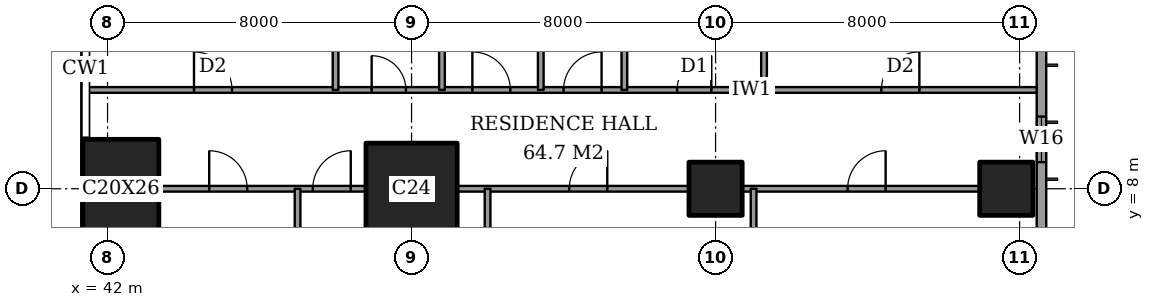
"""IFC4 building model, lengths in metres.
Left out: names, types, materials, properties, quantities, classifications, styles, units other than length and angle.
Written with IfcOpenShell. Run it as: python <this file> out.ifc"""

import sys

from ifc_helpers import new_model, si_unit, direction, frame, frame_2d, origin, origin_2d, place, context, subcontext, project, spatial, rectangle, extrude, element, fill, save


model = new_model("IFC4")
c1 = context("Model", 3, precision=1e-05, world=origin(), true_north=direction((0.0, 1.0)))
c2 = subcontext(c1, "Body", "Model", "MODEL_VIEW")
j1 = project(units=[si_unit("LENGTHUNIT", "METRE"), si_unit("PLANEANGLEUNIT", "RADIAN")], contexts=[c1])
p1 = place(None, origin())
s1 = spatial("IfcSite", under=j1, at=p1, CompositionType="ELEMENT")
p2 = place(p1, origin())
s2 = spatial("IfcBuilding", under=s1, at=p2, CompositionType="ELEMENT")
p3 = place(p2, frame((0.0, 0.0, 287.1)))
s3 = spatial("IfcBuildingStorey", under=s2, at=p3, CompositionType="ELEMENT", Elevation=287.1)
p4 = place(p3, frame((42.35, 8.0, 0.0), z_axis=(0.0, 0.0, 1.0), x_axis=(1.0, 0.0, 0.0)))
e1 = element("IfcColumn", 1, at=p4, inside=s3, PredefinedType="COLUMN", context=c2, shape_type="SweptSolid", body=[
    extrude(rectangle(XDim=2.0, YDim=2.6, at=origin_2d()), origin(), (0.0, 0.0, 1.0), 4.5),
])
p5 = place(p3, frame((50.0, 8.0, 0.0), z_axis=(0.0, 0.0, 1.0), x_axis=(1.0, 0.0, 0.0)))
e2 = element("IfcColumn", 2, at=p5, inside=s3, PredefinedType="COLUMN", context=c2, shape_type="SweptSolid", body=[
    extrude(rectangle(XDim=2.4, YDim=2.4, at=origin_2d()), origin(), (0.0, 0.0, 1.0), 4.5),
])
for number, where, z_axis, x_axis in (
    (3, (58.0, 8.0, 0.0), (0.0, 0.0, 1.0), (1.0, 0.0, 0.0)),
    (4, (65.65, 8.0, 0.0), (0.0, 0.0, 1.0), (1.0, 0.0, 0.0)),
):
    element("IfcColumn", number, at=place(p3, frame(where, z_axis=z_axis, x_axis=x_axis)), inside=s3, PredefinedType="COLUMN", context=c2, shape_type="SweptSolid", body=[
        extrude(rectangle(XDim=1.4, YDim=1.4, at=origin_2d()), origin(), (0.0, 0.0, 1.0), 4.5),
    ])
p6 = place(p3, frame((66.575, 3.175, 0.0), z_axis=(0.0, 0.0, 1.0), x_axis=(0.0, 1.0, 0.0)))
e5 = element("IfcWall", 5, at=p6, inside=s3, PredefinedType="SOLIDWALL", context=c2, shape_type="SweptSolid", body=[
    extrude(rectangle(XDim=41.65, YDim=0.25, at=frame_2d((20.825, 0.0))), origin(), (0.0, 0.0, 1.0), 4.5),
])
p7 = place(p6, frame((1.275, 0.0, 0.6)))
e6 = element("IfcOpeningElement", 6, at=p7, cuts=e5, PredefinedType="OPENING", context=c2, shape_type="SweptSolid", body=[
    extrude(rectangle(XDim=2.4, YDim=2.8, at=frame_2d((1.2, 1.4))), frame((0.0, 0.135, 0.0), z_axis=(0.0, -1.0, 0.0), x_axis=(1.0, 0.0, 0.0)), (0.0, 0.0, 1.0), 0.27),
])
p8 = place(p6, frame((5.525, 0.0, 0.6)))
e7 = element("IfcOpeningElement", 7, at=p8, cuts=e5, PredefinedType="OPENING", context=c2, shape_type="SweptSolid", body=[
    extrude(rectangle(XDim=1.2, YDim=2.8, at=frame_2d((0.6, 1.4))), frame((0.0, 0.135, 0.0), z_axis=(0.0, -1.0, 0.0), x_axis=(1.0, 0.0, 0.0)), (0.0, 0.0, 1.0), 0.27),
])
p9 = place(p6, frame((9.425, 0.0, 0.6)))
e8 = element("IfcOpeningElement", 8, at=p9, cuts=e5, PredefinedType="OPENING", context=c2, shape_type="SweptSolid", body=[
    extrude(rectangle(XDim=2.4, YDim=2.8, at=frame_2d((1.2, 1.4))), frame((0.0, 0.135, 0.0), z_axis=(0.0, -1.0, 0.0), x_axis=(1.0, 0.0, 0.0)), (0.0, 0.0, 1.0), 0.27),
])
p10 = place(p6, frame((14.525, 0.0, 0.6)))
e9 = element("IfcOpeningElement", 9, at=p10, cuts=e5, PredefinedType="OPENING", context=c2, shape_type="SweptSolid", body=[
    extrude(rectangle(XDim=2.4, YDim=2.8, at=frame_2d((1.2, 1.4))), frame((0.0, 0.135, 0.0), z_axis=(0.0, -1.0, 0.0), x_axis=(1.0, 0.0, 0.0)), (0.0, 0.0, 1.0), 0.27),
])
p11 = place(p6, frame((17.725, 0.0, 0.6)))
e10 = element("IfcOpeningElement", 10, at=p11, cuts=e5, PredefinedType="OPENING", context=c2, shape_type="SweptSolid", body=[
    extrude(rectangle(XDim=2.4, YDim=2.8, at=frame_2d((1.2, 1.4))), frame((0.0, 0.135, 0.0), z_axis=(0.0, -1.0, 0.0), x_axis=(1.0, 0.0, 0.0)), (0.0, 0.0, 1.0), 0.27),
])
p12 = place(p6, frame((21.525, 0.0, 0.6)))
e11 = element("IfcOpeningElement", 11, at=p12, cuts=e5, PredefinedType="OPENING", context=c2, shape_type="SweptSolid", body=[
    extrude(rectangle(XDim=2.4, YDim=2.8, at=frame_2d((1.2, 1.4))), frame((0.0, 0.135, 0.0), z_axis=(0.0, -1.0, 0.0), x_axis=(1.0, 0.0, 0.0)), (0.0, 0.0, 1.0), 0.27),
])
p13 = place(p6, frame((24.725, 0.0, 0.6)))
e12 = element("IfcOpeningElement", 12, at=p13, cuts=e5, PredefinedType="OPENING", context=c2, shape_type="SweptSolid", body=[
    extrude(rectangle(XDim=2.4, YDim=2.8, at=frame_2d((1.2, 1.4))), frame((0.0, 0.135, 0.0), z_axis=(0.0, -1.0, 0.0), x_axis=(1.0, 0.0, 0.0)), (0.0, 0.0, 1.0), 0.27),
])
p14 = place(p6, frame((29.825, 0.0, 0.6)))
e13 = element("IfcOpeningElement", 13, at=p14, cuts=e5, PredefinedType="OPENING", context=c2, shape_type="SweptSolid", body=[
    extrude(rectangle(XDim=2.4, YDim=2.8, at=frame_2d((1.2, 1.4))), frame((0.0, 0.135, 0.0), z_axis=(0.0, -1.0, 0.0), x_axis=(1.0, 0.0, 0.0)), (0.0, 0.0, 1.0), 0.27),
])
p15 = place(p6, frame((35.025, 0.0, 0.6)))
e14 = element("IfcOpeningElement", 14, at=p15, cuts=e5, PredefinedType="OPENING", context=c2, shape_type="SweptSolid", body=[
    extrude(rectangle(XDim=1.2, YDim=2.8, at=frame_2d((0.6, 1.4))), frame((0.0, 0.135, 0.0), z_axis=(0.0, -1.0, 0.0), x_axis=(1.0, 0.0, 0.0)), (0.0, 0.0, 1.0), 0.27),
])
p16 = place(p6, frame((38.075, 0.0, 0.6)))
e15 = element("IfcOpeningElement", 15, at=p16, cuts=e5, PredefinedType="OPENING", context=c2, shape_type="SweptSolid", body=[
    extrude(rectangle(XDim=2.4, YDim=2.8, at=frame_2d((1.2, 1.4))), frame((0.0, 0.135, 0.0), z_axis=(0.0, -1.0, 0.0), x_axis=(1.0, 0.0, 0.0)), (0.0, 0.0, 1.0), 0.27),
])
p17 = place(p3, frame((43.35, 8.0, 0.0), z_axis=(0.0, 0.0, 1.0), x_axis=(1.0, 0.0, 0.0)))
e16 = element("IfcWall", 16, at=p17, inside=s3, PredefinedType="PARTITIONING", context=c2, shape_type="SweptSolid", body=[
    extrude(rectangle(XDim=5.45, YDim=0.15, at=frame_2d((2.725, 0.0))), origin(), (0.0, 0.0, 1.0), 4.2),
])
p18 = place(p17, frame((4.05, 0.0, 0.0)))
e17 = element("IfcOpeningElement", 17, at=p18, cuts=e16, PredefinedType="OPENING", context=c2, shape_type="SweptSolid", body=[
    extrude(rectangle(XDim=1.0, YDim=2.1, at=frame_2d((0.5, 1.05))), frame((0.0, 0.085, 0.0), z_axis=(0.0, -1.0, 0.0), x_axis=(1.0, 0.0, 0.0)), (0.0, 0.0, 1.0), 0.17),
])
p19 = place(p17, frame((1.325, 0.0, 0.0)))
e18 = element("IfcOpeningElement", 18, at=p19, cuts=e16, PredefinedType="OPENING", context=c2, shape_type="SweptSolid", body=[
    extrude(rectangle(XDim=1.0, YDim=2.1, at=frame_2d((0.5, 1.05))), frame((0.0, 0.085, 0.0), z_axis=(0.0, -1.0, 0.0), x_axis=(1.0, 0.0, 0.0)), (0.0, 0.0, 1.0), 0.17),
])
p20 = place(p3, frame((51.2, 8.0, 0.0), z_axis=(0.0, 0.0, 1.0), x_axis=(1.0, 0.0, 0.0)))
e19 = element("IfcWall", 19, at=p20, inside=s3, PredefinedType="PARTITIONING", context=c2, shape_type="SweptSolid", body=[
    extrude(rectangle(XDim=6.1, YDim=0.15, at=frame_2d((3.05, 0.0))), origin(), (0.0, 0.0, 1.0), 4.2),
])
p21 = place(p20, frame((2.95, 0.0, 0.0)))
e20 = element("IfcOpeningElement", 20, at=p21, cuts=e19, PredefinedType="OPENING", context=c2, shape_type="SweptSolid", body=[
    extrude(rectangle(XDim=1.0, YDim=2.1, at=frame_2d((0.5, 1.05))), frame((0.0, 0.085, 0.0), z_axis=(0.0, -1.0, 0.0), x_axis=(1.0, 0.0, 0.0)), (0.0, 0.0, 1.0), 0.17),
])
p22 = place(p3, frame((58.7, 8.0, 0.0), z_axis=(0.0, 0.0, 1.0), x_axis=(1.0, 0.0, 0.0)))
e21 = element("IfcWall", 21, at=p22, inside=s3, PredefinedType="PARTITIONING", context=c2, shape_type="SweptSolid", body=[
    extrude(rectangle(XDim=6.25, YDim=0.15, at=frame_2d((3.125, 0.0))), origin(), (0.0, 0.0, 1.0), 4.2),
])
p23 = place(p22, frame((2.775, 0.0, 0.0)))
e22 = element("IfcOpeningElement", 22, at=p23, cuts=e21, PredefinedType="OPENING", context=c2, shape_type="SweptSolid", body=[
    extrude(rectangle(XDim=1.0, YDim=2.1, at=frame_2d((0.5, 1.05))), frame((0.0, 0.085, 0.0), z_axis=(0.0, -1.0, 0.0), x_axis=(1.0, 0.0, 0.0)), (0.0, 0.0, 1.0), 0.17),
])
p24 = place(p3, frame((41.439, 10.6, 0.0), z_axis=(0.0, 0.0, 1.0), x_axis=(1.0, 0.0, 0.0)))
e23 = element("IfcWall", 23, at=p24, inside=s3, PredefinedType="PARTITIONING", context=c2, shape_type="SweptSolid", body=[
    extrude(rectangle(XDim=25.011, YDim=0.15, at=frame_2d((12.505, 0.0))), origin(), (0.0, 0.0, 1.0), 4.2),
])
p25 = place(p24, frame((12.561, 0.0, 0.0)))
e24 = element("IfcOpeningElement", 24, at=p25, cuts=e23, PredefinedType="OPENING", context=c2, shape_type="SweptSolid", body=[
    extrude(rectangle(XDim=1.0, YDim=2.1, at=frame_2d((0.5, 1.05))), frame((0.0, 0.085, 0.0), z_axis=(0.0, -1.0, 0.0), x_axis=(1.0, 0.0, 0.0)), (0.0, 0.0, 1.0), 0.17),
])
p26 = place(p24, frame((20.924, 0.0, 0.0)))
e25 = element("IfcOpeningElement", 25, at=p26, cuts=e23, PredefinedType="OPENING", context=c2, shape_type="SweptSolid", body=[
    extrude(rectangle(XDim=1.0, YDim=2.1, at=frame_2d((0.5, 1.05))), frame((0.0, 0.085, 0.0), z_axis=(0.0, -1.0, 0.0), x_axis=(1.0, 0.0, 0.0)), (0.0, 0.0, 1.0), 0.17),
])
p27 = place(p24, frame((15.549, 0.0, 0.0)))
e26 = element("IfcOpeningElement", 26, at=p27, cuts=e23, PredefinedType="OPENING", context=c2, shape_type="SweptSolid", body=[
    extrude(rectangle(XDim=0.9, YDim=2.1, at=frame_2d((0.45, 1.05))), frame((0.0, 0.085, 0.0), z_axis=(0.0, -1.0, 0.0), x_axis=(1.0, 0.0, 0.0)), (0.0, 0.0, 1.0), 0.17),
])
p28 = place(p24, frame((10.161, 0.0, 0.0)))
e27 = element("IfcOpeningElement", 27, at=p28, cuts=e23, PredefinedType="OPENING", context=c2, shape_type="SweptSolid", body=[
    extrude(rectangle(XDim=1.0, YDim=2.1, at=frame_2d((0.5, 1.05))), frame((0.0, 0.085, 0.0), z_axis=(0.0, -1.0, 0.0), x_axis=(1.0, 0.0, 0.0)), (0.0, 0.0, 1.0), 0.17),
])
p29 = place(p24, frame((7.511, 0.0, 0.0)))
e28 = element("IfcOpeningElement", 28, at=p29, cuts=e23, PredefinedType="OPENING", context=c2, shape_type="SweptSolid", body=[
    extrude(rectangle(XDim=0.9, YDim=2.1, at=frame_2d((0.45, 1.05))), frame((0.0, 0.085, 0.0), z_axis=(0.0, -1.0, 0.0), x_axis=(1.0, 0.0, 0.0)), (0.0, 0.0, 1.0), 0.17),
])
p30 = place(p24, frame((2.836, 0.0, 0.0)))
e29 = element("IfcOpeningElement", 29, at=p30, cuts=e23, PredefinedType="OPENING", context=c2, shape_type="SweptSolid", body=[
    extrude(rectangle(XDim=1.0, YDim=2.1, at=frame_2d((0.5, 1.05))), frame((0.0, 0.085, 0.0), z_axis=(0.0, -1.0, 0.0), x_axis=(1.0, 0.0, 0.0)), (0.0, 0.0, 1.0), 0.17),
])
p31 = place(p3, frame((47.0, -0.561, 0.0), z_axis=(0.0, 0.0, 1.0), x_axis=(0.0, 1.0, 0.0)))
e30 = element("IfcWall", 30, at=p31, inside=s3, PredefinedType="PARTITIONING", context=c2, shape_type="SweptSolid", body=[
    extrude(rectangle(XDim=8.561, YDim=0.15, at=frame_2d((4.281, 0.0))), origin(), (0.0, 0.0, 1.0), 4.2),
])
p32 = place(p3, frame((48.0, 10.6, 0.0), z_axis=(0.0, 0.0, 1.0), x_axis=(0.0, 1.0, 0.0)))
e31 = element("IfcWall", 31, at=p32, inside=s3, PredefinedType="PARTITIONING", context=c2, shape_type="SweptSolid", body=[
    extrude(rectangle(XDim=13.4, YDim=0.15, at=frame_2d((6.7, 0.0))), origin(), (0.0, 0.0, 1.0), 4.2),
])
p33 = place(p32, frame((10.8, 0.0, 0.0)))
e32 = element("IfcOpeningElement", 32, at=p33, cuts=e31, PredefinedType="OPENING", context=c2, shape_type="SweptSolid", body=[
    extrude(rectangle(XDim=1.2, YDim=2.4, at=frame_2d((0.6, 1.2))), frame((0.0, 0.085, 0.0), z_axis=(0.0, -1.0, 0.0), x_axis=(1.0, 0.0, 0.0)), (0.0, 0.0, 1.0), 0.17),
])
p34 = place(p32, frame((7.45, 0.0, 0.0)))
e33 = element("IfcOpeningElement", 33, at=p34, cuts=e31, PredefinedType="OPENING", context=c2, shape_type="SweptSolid", body=[
    extrude(rectangle(XDim=0.9, YDim=2.1, at=frame_2d((0.45, 1.05))), frame((0.0, 0.085, 0.0), z_axis=(0.0, -1.0, 0.0), x_axis=(1.0, 0.0, 0.0)), (0.0, 0.0, 1.0), 0.17),
])
p35 = place(p3, frame((50.8, 10.6, 0.0), z_axis=(0.0, 0.0, 1.0), x_axis=(0.0, 1.0, 0.0)))
e34 = element("IfcWall", 34, at=p35, inside=s3, PredefinedType="PARTITIONING", context=c2, shape_type="SweptSolid", body=[
    extrude(rectangle(XDim=4.2, YDim=0.15, at=frame_2d((2.1, 0.0))), origin(), (0.0, 0.0, 1.0), 4.2),
])
p36 = place(p3, frame((52.0, -0.561, 0.0), z_axis=(0.0, 0.0, 1.0), x_axis=(0.0, 1.0, 0.0)))
e35 = element("IfcWall", 35, at=p36, inside=s3, PredefinedType="PARTITIONING", context=c2, shape_type="SweptSolid", body=[
    extrude(rectangle(XDim=8.561, YDim=0.15, at=frame_2d((4.281, 0.0))), origin(), (0.0, 0.0, 1.0), 4.2),
])
p37 = place(p3, frame((53.4, 10.6, 0.0), z_axis=(0.0, 0.0, 1.0), x_axis=(0.0, 1.0, 0.0)))
e36 = element("IfcWall", 36, at=p37, inside=s3, PredefinedType="PARTITIONING", context=c2, shape_type="SweptSolid", body=[
    extrude(rectangle(XDim=4.4, YDim=0.15, at=frame_2d((2.2, 0.0))), origin(), (0.0, 0.0, 1.0), 4.2),
])
p38 = place(p3, frame((55.6, 10.6, 0.0), z_axis=(0.0, 0.0, 1.0), x_axis=(0.0, 1.0, 0.0)))
e37 = element("IfcWall", 37, at=p38, inside=s3, PredefinedType="PARTITIONING", context=c2, shape_type="SweptSolid", body=[
    extrude(rectangle(XDim=11.0, YDim=0.15, at=frame_2d((5.5, 0.0))), origin(), (0.0, 0.0, 1.0), 4.2),
])
p39 = place(p38, frame((7.2, 0.0, 0.0)))
e38 = element("IfcOpeningElement", 38, at=p39, cuts=e37, PredefinedType="OPENING", context=c2, shape_type="SweptSolid", body=[
    extrude(rectangle(XDim=1.0, YDim=2.1, at=frame_2d((0.5, 1.05))), frame((0.0, 0.085, 0.0), z_axis=(0.0, -1.0, 0.0), x_axis=(1.0, 0.0, 0.0)), (0.0, 0.0, 1.0), 0.17),
])
p40 = place(p3, frame((59.0, -0.561, 0.0), z_axis=(0.0, 0.0, 1.0), x_axis=(0.0, 1.0, 0.0)))
e39 = element("IfcWall", 39, at=p40, inside=s3, PredefinedType="PARTITIONING", context=c2, shape_type="SweptSolid", body=[
    extrude(rectangle(XDim=8.561, YDim=0.15, at=frame_2d((4.281, 0.0))), origin(), (0.0, 0.0, 1.0), 4.2),
])
p41 = place(p3, frame((59.275, 10.6, 0.0), z_axis=(0.0, 0.0, 1.0), x_axis=(0.0, 1.0, 0.0)))
e40 = element("IfcWall", 40, at=p41, inside=s3, PredefinedType="PARTITIONING", context=c2, shape_type="SweptSolid", body=[
    extrude(rectangle(XDim=4.2, YDim=0.15, at=frame_2d((2.1, 0.0))), origin(), (0.0, 0.0, 1.0), 4.2),
])
p42 = place(p8, origin())
e41 = element("IfcWindow", 41, at=p42, inside=s3, PartitioningType="SINGLE_PANEL", PredefinedType="WINDOW", context=c2, shape_type="SweptSolid", body=[
    extrude(rectangle(XDim=1.2, YDim=2.8, at=frame_2d((0.6, 1.4))), frame((0.0, 0.03, 0.0), z_axis=(0.0, -1.0, 0.0), x_axis=(1.0, 0.0, 0.0)), (0.0, 0.0, 1.0), 0.06),
])
fill(e7, e41)
p43 = place(p23, origin())
e42 = element("IfcDoor", 42, at=p43, inside=s3, OperationType="SINGLE_SWING_LEFT", PredefinedType="DOOR", context=c2, shape_type="SweptSolid", body=[
    extrude(rectangle(XDim=1.0, YDim=2.1, at=frame_2d((0.5, 1.05))), frame((0.0, 0.025, 0.0), z_axis=(0.0, -1.0, 0.0), x_axis=(1.0, 0.0, 0.0)), (0.0, 0.0, 1.0), 0.05),
])
fill(e22, e42)
p44 = place(p21, origin())
e43 = element("IfcDoor", 43, at=p44, inside=s3, OperationType="SINGLE_SWING_LEFT", PredefinedType="DOOR", context=c2, shape_type="SweptSolid", body=[
    extrude(rectangle(XDim=1.0, YDim=2.1, at=frame_2d((0.5, 1.05))), frame((0.0, 0.025, 0.0), z_axis=(0.0, -1.0, 0.0), x_axis=(1.0, 0.0, 0.0)), (0.0, 0.0, 1.0), 0.05),
])
fill(e20, e43)
p45 = place(p18, origin())
e44 = element("IfcDoor", 44, at=p45, inside=s3, OperationType="SINGLE_SWING_LEFT", PredefinedType="DOOR", context=c2, shape_type="SweptSolid", body=[
    extrude(rectangle(XDim=1.0, YDim=2.1, at=frame_2d((0.5, 1.05))), frame((0.0, 0.025, 0.0), z_axis=(0.0, -1.0, 0.0), x_axis=(1.0, 0.0, 0.0)), (0.0, 0.0, 1.0), 0.05),
])
fill(e17, e44)
p46 = place(p19, origin())
e45 = element("IfcDoor", 45, at=p46, inside=s3, OperationType="SINGLE_SWING_RIGHT", PredefinedType="DOOR", context=c2, shape_type="SweptSolid", body=[
    extrude(rectangle(XDim=1.0, YDim=2.1, at=frame_2d((0.5, 1.05))), frame((0.0, 0.025, 0.0), z_axis=(0.0, -1.0, 0.0), x_axis=(1.0, 0.0, 0.0)), (0.0, 0.0, 1.0), 0.05),
])
fill(e18, e45)
p47 = place(p25, origin())
e46 = element("IfcDoor", 46, at=p47, inside=s3, OperationType="SINGLE_SWING_LEFT", PredefinedType="DOOR", context=c2, shape_type="SweptSolid", body=[
    extrude(rectangle(XDim=1.0, YDim=2.1, at=frame_2d((0.5, 1.05))), frame((0.0, 0.025, 0.0), z_axis=(0.0, -1.0, 0.0), x_axis=(1.0, 0.0, 0.0)), (0.0, 0.0, 1.0), 0.05),
])
fill(e24, e46)
p48 = place(p26, origin())
e47 = element("IfcDoor", 47, at=p48, inside=s3, OperationType="SINGLE_SWING_LEFT", PredefinedType="DOOR", context=c2, shape_type="SweptSolid", body=[
    extrude(rectangle(XDim=1.0, YDim=2.1, at=frame_2d((0.5, 1.05))), frame((0.0, 0.025, 0.0), z_axis=(0.0, -1.0, 0.0), x_axis=(1.0, 0.0, 0.0)), (0.0, 0.0, 1.0), 0.05),
])
fill(e25, e47)
p49 = place(p27, origin())
e48 = element("IfcDoor", 48, at=p49, inside=s3, OperationType="SINGLE_SWING_LEFT", PredefinedType="DOOR", context=c2, shape_type="SweptSolid", body=[
    extrude(rectangle(XDim=0.9, YDim=2.1, at=frame_2d((0.45, 1.05))), frame((0.0, 0.025, 0.0), z_axis=(0.0, -1.0, 0.0), x_axis=(1.0, 0.0, 0.0)), (0.0, 0.0, 1.0), 0.05),
])
fill(e26, e48)
p50 = place(p28, origin())
e49 = element("IfcDoor", 49, at=p50, inside=s3, OperationType="SINGLE_SWING_RIGHT", PredefinedType="DOOR", context=c2, shape_type="SweptSolid", body=[
    extrude(rectangle(XDim=1.0, YDim=2.1, at=frame_2d((0.5, 1.05))), frame((0.0, 0.025, 0.0), z_axis=(0.0, -1.0, 0.0), x_axis=(1.0, 0.0, 0.0)), (0.0, 0.0, 1.0), 0.05),
])
fill(e27, e49)
p51 = place(p29, origin())
e50 = element("IfcDoor", 50, at=p51, inside=s3, OperationType="SINGLE_SWING_RIGHT", PredefinedType="DOOR", context=c2, shape_type="SweptSolid", body=[
    extrude(rectangle(XDim=0.9, YDim=2.1, at=frame_2d((0.45, 1.05))), frame((0.0, 0.025, 0.0), z_axis=(0.0, -1.0, 0.0), x_axis=(1.0, 0.0, 0.0)), (0.0, 0.0, 1.0), 0.05),
])
fill(e28, e50)
p52 = place(p30, origin())
e51 = element("IfcDoor", 51, at=p52, inside=s3, OperationType="SINGLE_SWING_RIGHT", PredefinedType="DOOR", context=c2, shape_type="SweptSolid", body=[
    extrude(rectangle(XDim=1.0, YDim=2.1, at=frame_2d((0.5, 1.05))), frame((0.0, 0.025, 0.0), z_axis=(0.0, -1.0, 0.0), x_axis=(1.0, 0.0, 0.0)), (0.0, 0.0, 1.0), 0.05),
])
fill(e29, e51)
save(model, sys.argv[1])
